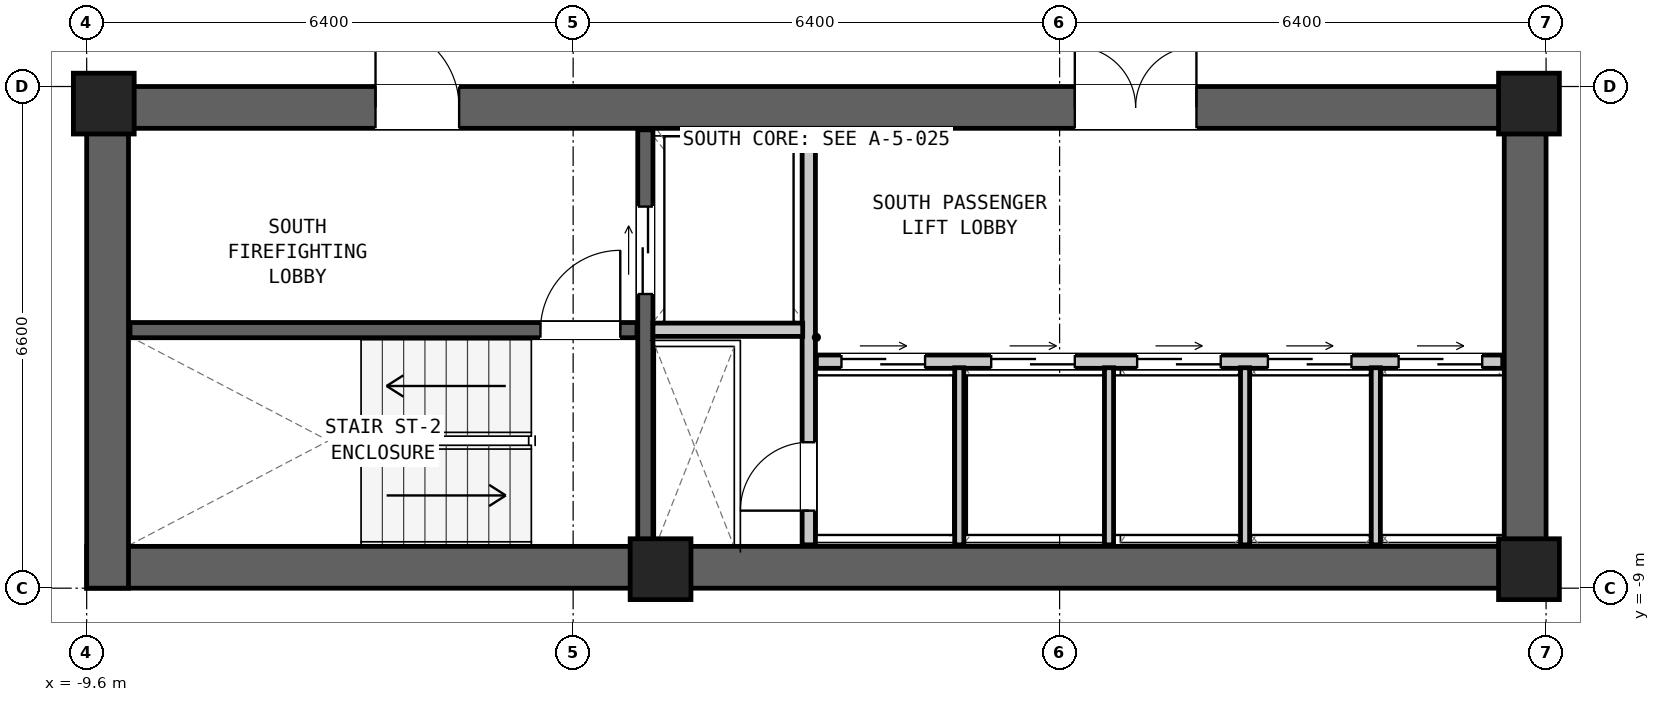
"""IFC4 building model, lengths in metres.
Left out: names, types, materials, properties, quantities, classifications, styles, units other than length and angle.
Written with IfcOpenShell. Run it as: python <this file> out.ifc"""

import sys

from ifc_helpers import new_model, si_unit, direction, frame, frame_2d, origin, origin_2d, place, context, subcontext, project, spatial, rectangle, extrude, element, fill, save


model = new_model("IFC4")
c1 = context("Model", 3, precision=1e-05, world=origin(), true_north=direction((0.0, 1.0)))
c2 = subcontext(c1, "Body", "Model", "MODEL_VIEW")
j1 = project(units=[si_unit("LENGTHUNIT", "METRE"), si_unit("PLANEANGLEUNIT", "RADIAN")], contexts=[c1])
p1 = place(None, origin())
s1 = spatial("IfcSite", under=j1, at=p1, CompositionType="ELEMENT")
p2 = place(p1, origin())
s2 = spatial("IfcBuilding", under=s1, at=p2, CompositionType="ELEMENT")
p3 = place(p2, frame((0.0, 0.0, 78.6)))
s3 = spatial("IfcBuildingStorey", under=s2, at=p3, CompositionType="ELEMENT", Elevation=78.6)
p4 = place(p3, frame((-9.6, -8.725, 0.0), z_axis=(0.0, 0.0, 1.0), x_axis=(1.0, 0.0, 0.0)))
e1 = element("IfcWall", 1, at=p4, inside=s3, PredefinedType="SHEAR", context=c2, shape_type="SweptSolid", body=[
    extrude(rectangle(XDim=19.2, YDim=0.55, at=frame_2d((9.6, 0.0))), origin(), (0.0, 0.0, 1.0), 3.05),
])
p5 = place(p3, frame((-9.6, -2.675, 0.0), z_axis=(0.0, 0.0, 1.0), x_axis=(1.0, 0.0, 0.0)))
e2 = element("IfcWall", 2, at=p5, inside=s3, PredefinedType="SHEAR", context=c2, shape_type="SweptSolid", body=[
    extrude(rectangle(XDim=19.2, YDim=0.55, at=frame_2d((9.6, 0.0))), origin(), (0.0, 0.0, 1.0), 3.05),
])
p6 = place(p5, frame((3.8, 0.0, 0.0)))
e3 = element("IfcOpeningElement", 3, at=p6, cuts=e2, PredefinedType="OPENING", context=c2, shape_type="SweptSolid", body=[
    extrude(rectangle(XDim=1.1, YDim=2.08, at=frame_2d((0.55, 1.04))), frame((0.0, 0.287, 0.0), z_axis=(0.0, -1.0, 0.0), x_axis=(1.0, 0.0, 0.0)), (0.0, 0.0, 1.0), 0.574),
])
p7 = place(p5, frame((13.0, 0.0, 0.0)))
e4 = element("IfcOpeningElement", 4, at=p7, cuts=e2, PredefinedType="OPENING", context=c2, shape_type="SweptSolid", body=[
    extrude(rectangle(XDim=1.6, YDim=2.12, at=frame_2d((0.8, 1.06))), frame((0.0, 0.287, 0.0), z_axis=(0.0, -1.0, 0.0), x_axis=(1.0, 0.0, 0.0)), (0.0, 0.0, 1.0), 0.574),
])
for number, where, z_axis, x_axis in (
    (5, (-9.325, -9.0, 0.0), (0.0, 0.0, 1.0), (0.0, 1.0, 0.0)),
    (6, (9.325, -9.0, 0.0), (0.0, 0.0, 1.0), (0.0, 1.0, 0.0)),
):
    element("IfcWall", number, at=place(p3, frame(where, z_axis=z_axis, x_axis=x_axis)), inside=s3, PredefinedType="SHEAR", context=c2, shape_type="SweptSolid", body=[
        extrude(rectangle(XDim=6.6, YDim=0.55, at=frame_2d((3.3, 0.0))), origin(), (0.0, 0.0, 1.0), 3.05),
    ])
for number, where, z_axis, x_axis in (
    (7, (-9.375, -2.625, 0.0), (0.0, 0.0, 1.0), (1.0, 0.0, 0.0)),
    (8, (9.375, -2.625, 0.0), (0.0, 0.0, 1.0), (1.0, 0.0, 0.0)),
    (9, (-2.05, -8.75, 0.0), (0.0, 0.0, 1.0), (1.0, 0.0, 0.0)),
    (10, (9.375, -8.75, 0.0), (0.0, 0.0, 1.0), (1.0, 0.0, 0.0)),
):
    element("IfcColumn", number, at=place(p3, frame(where, z_axis=z_axis, x_axis=x_axis)), inside=s3, PredefinedType="COLUMN", context=c2, shape_type="SweptSolid", body=[
        extrude(rectangle(XDim=0.8, YDim=0.8, at=origin_2d()), origin(), (0.0, 0.0, 1.0), 3.05),
    ])
p8 = place(p3, frame((-9.03, -5.605, 0.0), z_axis=(0.0, 0.0, 1.0), x_axis=(1.0, 0.0, 0.0)))
e11 = element("IfcWall", 11, at=p8, inside=s3, PredefinedType="SHEAR", context=c2, shape_type="SweptSolid", body=[
    extrude(rectangle(XDim=6.67, YDim=0.2, at=frame_2d((3.335, 0.0))), origin(), (0.0, 0.0, 1.0), 2.83),
])
p9 = place(p8, frame((5.4, 0.0, 0.0)))
e12 = element("IfcOpeningElement", 12, at=p9, cuts=e11, PredefinedType="OPENING", context=c2, shape_type="SweptSolid", body=[
    extrude(rectangle(XDim=1.05, YDim=2.08, at=frame_2d((0.525, 1.04))), frame((0.0, 0.112, 0.0), z_axis=(0.0, -1.0, 0.0), x_axis=(1.0, 0.0, 0.0)), (0.0, 0.0, 1.0), 0.224),
])
p10 = place(p3, frame((-2.25, -8.43, 0.0), z_axis=(0.0, 0.0, 1.0), x_axis=(0.0, 1.0, 0.0)))
e13 = element("IfcWall", 13, at=p10, inside=s3, PredefinedType="SHEAR", context=c2, shape_type="SweptSolid", body=[
    extrude(rectangle(XDim=5.46, YDim=0.2, at=frame_2d((2.73, 0.0))), origin(), (0.0, 0.0, 1.0), 2.83),
])
p11 = place(p10, frame((3.3, 0.0, 0.0)))
e14 = element("IfcOpeningElement", 14, at=p11, cuts=e13, PredefinedType="OPENING", context=c2, shape_type="SweptSolid", body=[
    extrude(rectangle(XDim=1.15, YDim=2.08, at=frame_2d((0.575, 1.04))), frame((0.0, 0.112, 0.0), z_axis=(0.0, -1.0, 0.0), x_axis=(1.0, 0.0, 0.0)), (0.0, 0.0, 1.0), 0.224),
])
p12 = place(p3, frame((-0.1, -8.43, 0.0), z_axis=(0.0, 0.0, 1.0), x_axis=(0.0, 1.0, 0.0)))
e15 = element("IfcWall", 15, at=p12, inside=s3, PredefinedType="PARTITIONING", context=c2, shape_type="SweptSolid", body=[
    extrude(rectangle(XDim=5.46, YDim=0.175, at=frame_2d((2.73, 0.0))), origin(), (0.0, 0.0, 1.0), 2.83),
])
p13 = place(p12, frame((0.45, 0.0, 0.0)))
e16 = element("IfcOpeningElement", 16, at=p13, cuts=e15, PredefinedType="OPENING", context=c2, shape_type="SweptSolid", body=[
    extrude(rectangle(XDim=0.9, YDim=2.05, at=frame_2d((0.45, 1.025))), frame((0.0, 0.1, 0.0), z_axis=(0.0, -1.0, 0.0), x_axis=(1.0, 0.0, 0.0)), (0.0, 0.0, 1.0), 0.199),
])
p14 = place(p3, frame((-2.15, -5.6, 0.0), z_axis=(0.0, 0.0, 1.0), x_axis=(1.0, 0.0, 0.0)))
e17 = element("IfcWall", 17, at=p14, inside=s3, PredefinedType="PARTITIONING", context=c2, shape_type="SweptSolid", body=[
    extrude(rectangle(XDim=1.97, YDim=0.175, at=frame_2d((0.985, 0.0))), origin(), (0.0, 0.0, 1.0), 2.83),
])
p15 = place(p3, frame((0.0, -6.02, 0.0), z_axis=(0.0, 0.0, 1.0), x_axis=(1.0, 0.0, 0.0)))
e18 = element("IfcWall", 18, at=p15, inside=s3, PredefinedType="PARTITIONING", context=c2, shape_type="SweptSolid", body=[
    extrude(rectangle(XDim=9.03, YDim=0.175, at=frame_2d((4.515, 0.0))), origin(), (0.0, 0.0, 1.0), 2.83),
])
p16 = place(p15, frame((0.33, 0.0, 0.0)))
e19 = element("IfcOpeningElement", 19, at=p16, cuts=e18, PredefinedType="OPENING", context=c2, shape_type="SweptSolid", body=[
    extrude(rectangle(XDim=1.1, YDim=2.06, at=frame_2d((0.55, 1.03))), frame((0.0, 0.1, 0.0), z_axis=(0.0, -1.0, 0.0), x_axis=(1.0, 0.0, 0.0)), (0.0, 0.0, 1.0), 0.199),
])
p17 = place(p15, frame((2.3, 0.0, 0.0)))
e20 = element("IfcOpeningElement", 20, at=p17, cuts=e18, PredefinedType="OPENING", context=c2, shape_type="SweptSolid", body=[
    extrude(rectangle(XDim=1.1, YDim=2.06, at=frame_2d((0.55, 1.03))), frame((0.0, 0.1, 0.0), z_axis=(0.0, -1.0, 0.0), x_axis=(1.0, 0.0, 0.0)), (0.0, 0.0, 1.0), 0.199),
])
p18 = place(p15, frame((4.22, 0.0, 0.0)))
e21 = element("IfcOpeningElement", 21, at=p18, cuts=e18, PredefinedType="OPENING", context=c2, shape_type="SweptSolid", body=[
    extrude(rectangle(XDim=1.1, YDim=2.06, at=frame_2d((0.55, 1.03))), frame((0.0, 0.1, 0.0), z_axis=(0.0, -1.0, 0.0), x_axis=(1.0, 0.0, 0.0)), (0.0, 0.0, 1.0), 0.199),
])
p19 = place(p15, frame((5.94, 0.0, 0.0)))
e22 = element("IfcOpeningElement", 22, at=p19, cuts=e18, PredefinedType="OPENING", context=c2, shape_type="SweptSolid", body=[
    extrude(rectangle(XDim=1.1, YDim=2.06, at=frame_2d((0.55, 1.03))), frame((0.0, 0.1, 0.0), z_axis=(0.0, -1.0, 0.0), x_axis=(1.0, 0.0, 0.0)), (0.0, 0.0, 1.0), 0.199),
])
p20 = place(p15, frame((7.66, 0.0, 0.0)))
e23 = element("IfcOpeningElement", 23, at=p20, cuts=e18, PredefinedType="OPENING", context=c2, shape_type="SweptSolid", body=[
    extrude(rectangle(XDim=1.1, YDim=2.06, at=frame_2d((0.55, 1.03))), frame((0.0, 0.1, 0.0), z_axis=(0.0, -1.0, 0.0), x_axis=(1.0, 0.0, 0.0)), (0.0, 0.0, 1.0), 0.199),
])
for number, where, z_axis, x_axis in (
    (24, (1.88, -8.43, 0.0), (0.0, 0.0, 1.0), (0.0, 1.0, 0.0)),
    (25, (3.85, -8.43, 0.0), (0.0, 0.0, 1.0), (0.0, 1.0, 0.0)),
    (26, (5.64, -8.43, 0.0), (0.0, 0.0, 1.0), (0.0, 1.0, 0.0)),
    (27, (7.36, -8.43, 0.0), (0.0, 0.0, 1.0), (0.0, 1.0, 0.0)),
):
    element("IfcWall", number, at=place(p3, frame(where, z_axis=z_axis, x_axis=x_axis)), inside=s3, PredefinedType="PARTITIONING", context=c2, shape_type="SweptSolid", body=[
        extrude(rectangle(XDim=2.33, YDim=0.12, at=frame_2d((1.165, 0.0))), origin(), (0.0, 0.0, 1.0), 2.83),
    ])
p21 = place(p9, origin())
e28 = element("IfcDoor", 28, at=p21, inside=s3, OperationType="SINGLE_SWING_RIGHT", PredefinedType="DOOR", context=c2, shape_type="SweptSolid", body=[
    extrude(rectangle(XDim=1.05, YDim=2.08, at=frame_2d((0.525, 1.04))), frame((0.0, 0.025, 0.0), z_axis=(0.0, -1.0, 0.0), x_axis=(1.0, 0.0, 0.0)), (0.0, 0.0, 1.0), 0.05),
])
fill(e12, e28)
p22 = place(p6, origin())
e29 = element("IfcDoor", 29, at=p22, inside=s3, OperationType="SINGLE_SWING_LEFT", PredefinedType="DOOR", context=c2, shape_type="SweptSolid", body=[
    extrude(rectangle(XDim=1.1, YDim=2.08, at=frame_2d((0.55, 1.04))), frame((0.0, 0.025, 0.0), z_axis=(0.0, -1.0, 0.0), x_axis=(1.0, 0.0, 0.0)), (0.0, 0.0, 1.0), 0.05),
])
fill(e3, e29)
p23 = place(p11, origin())
e30 = element("IfcDoor", 30, at=p23, inside=s3, OperationType="DOUBLE_DOOR_SLIDING", PredefinedType="DOOR", context=c2, shape_type="SweptSolid", body=[
    extrude(rectangle(XDim=1.15, YDim=2.08, at=frame_2d((0.575, 1.04))), frame((0.0, 0.025, 0.0), z_axis=(0.0, -1.0, 0.0), x_axis=(1.0, 0.0, 0.0)), (0.0, 0.0, 1.0), 0.05),
])
fill(e14, e30)
p24 = place(p13, origin())
e31 = element("IfcDoor", 31, at=p24, inside=s3, OperationType="SINGLE_SWING_LEFT", PredefinedType="DOOR", context=c2, shape_type="SweptSolid", body=[
    extrude(rectangle(XDim=0.9, YDim=2.05, at=frame_2d((0.45, 1.025))), frame((0.0, 0.025, 0.0), z_axis=(0.0, -1.0, 0.0), x_axis=(1.0, 0.0, 0.0)), (0.0, 0.0, 1.0), 0.05),
])
fill(e16, e31)
p25 = place(p7, origin())
e32 = element("IfcDoor", 32, at=p25, inside=s3, OperationType="DOUBLE_DOOR_SINGLE_SWING", PredefinedType="DOOR", context=c2, shape_type="SweptSolid", body=[
    extrude(rectangle(XDim=1.6, YDim=2.12, at=frame_2d((0.8, 1.06))), frame((0.0, 0.025, 0.0), z_axis=(0.0, -1.0, 0.0), x_axis=(1.0, 0.0, 0.0)), (0.0, 0.0, 1.0), 0.05),
])
fill(e4, e32)
p26 = place(p16, origin())
e33 = element("IfcDoor", 33, at=p26, inside=s3, OperationType="DOUBLE_DOOR_SLIDING", PredefinedType="DOOR", context=c2, shape_type="SweptSolid", body=[
    extrude(rectangle(XDim=1.1, YDim=2.06, at=frame_2d((0.55, 1.03))), frame((0.0, 0.025, 0.0), z_axis=(0.0, -1.0, 0.0), x_axis=(1.0, 0.0, 0.0)), (0.0, 0.0, 1.0), 0.05),
])
fill(e19, e33)
p27 = place(p17, origin())
e34 = element("IfcDoor", 34, at=p27, inside=s3, OperationType="DOUBLE_DOOR_SLIDING", PredefinedType="DOOR", context=c2, shape_type="SweptSolid", body=[
    extrude(rectangle(XDim=1.1, YDim=2.06, at=frame_2d((0.55, 1.03))), frame((0.0, 0.025, 0.0), z_axis=(0.0, -1.0, 0.0), x_axis=(1.0, 0.0, 0.0)), (0.0, 0.0, 1.0), 0.05),
])
fill(e20, e34)
p28 = place(p18, origin())
e35 = element("IfcDoor", 35, at=p28, inside=s3, OperationType="DOUBLE_DOOR_SLIDING", PredefinedType="DOOR", context=c2, shape_type="SweptSolid", body=[
    extrude(rectangle(XDim=1.1, YDim=2.06, at=frame_2d((0.55, 1.03))), frame((0.0, 0.025, 0.0), z_axis=(0.0, -1.0, 0.0), x_axis=(1.0, 0.0, 0.0)), (0.0, 0.0, 1.0), 0.05),
])
fill(e21, e35)
p29 = place(p19, origin())
e36 = element("IfcDoor", 36, at=p29, inside=s3, OperationType="DOUBLE_DOOR_SLIDING", PredefinedType="DOOR", context=c2, shape_type="SweptSolid", body=[
    extrude(rectangle(XDim=1.1, YDim=2.06, at=frame_2d((0.55, 1.03))), frame((0.0, 0.025, 0.0), z_axis=(0.0, -1.0, 0.0), x_axis=(1.0, 0.0, 0.0)), (0.0, 0.0, 1.0), 0.05),
])
fill(e22, e36)
p30 = place(p20, origin())
e37 = element("IfcDoor", 37, at=p30, inside=s3, OperationType="DOUBLE_DOOR_SLIDING", PredefinedType="DOOR", context=c2, shape_type="SweptSolid", body=[
    extrude(rectangle(XDim=1.1, YDim=2.06, at=frame_2d((0.55, 1.03))), frame((0.0, 0.025, 0.0), z_axis=(0.0, -1.0, 0.0), x_axis=(1.0, 0.0, 0.0)), (0.0, 0.0, 1.0), 0.05),
])
fill(e23, e37)
save(model, sys.argv[1])
